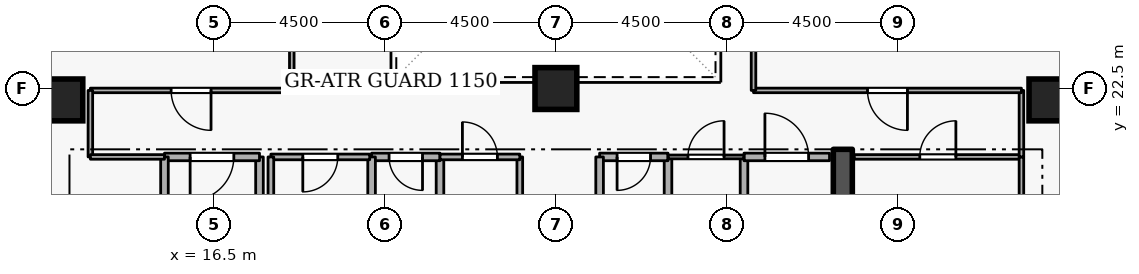
"""IFC4 building model, lengths in metres.
Left out: names, types, materials, properties, quantities, classifications, styles, units other than length and angle.
Written with IfcOpenShell. Run it as: python <this file> out.ifc"""

import sys

from ifc_helpers import new_model, si_unit, direction, frame, frame_2d, origin, origin_2d, place, context, subcontext, project, spatial, rectangle, extrude, element, fill, save


model = new_model("IFC4")
c1 = context("Model", 3, precision=1e-05, world=origin(), true_north=direction((0.0, 1.0)))
c2 = subcontext(c1, "Body", "Model", "MODEL_VIEW")
j1 = project(units=[si_unit("LENGTHUNIT", "METRE"), si_unit("PLANEANGLEUNIT", "RADIAN")], contexts=[c1])
p1 = place(None, origin())
s1 = spatial("IfcSite", under=j1, at=p1, CompositionType="ELEMENT")
p2 = place(p1, origin())
s2 = spatial("IfcBuilding", under=s1, at=p2, CompositionType="ELEMENT")
p3 = place(p2, frame((0.0, 0.0, 178.5)))
s3 = spatial("IfcBuildingStorey", under=s2, at=p3, CompositionType="ELEMENT", Elevation=178.5)
p4 = place(p3, frame((33.05, 15.1, 0.0), z_axis=(0.0, 0.0, 1.0), x_axis=(0.0, 1.0, 0.0)))
e1 = element("IfcWall", 1, at=p4, inside=s3, PredefinedType="SHEAR", context=c2, shape_type="SweptSolid", body=[
    extrude(rectangle(XDim=5.8, YDim=0.5, at=frame_2d((2.9, 0.0))), origin(), (0.0, 0.0, 1.0), 3.6),
])
for number, where, z_axis, x_axis in (
    (2, (12.5, 22.2, 0.0), (0.0, 0.0, 1.0), (1.0, 0.0, 0.0)),
    (3, (38.5, 22.2, 0.0), (0.0, 0.0, 1.0), (1.0, 0.0, 0.0)),
    (4, (25.5, 22.5, 0.0), (0.0, 0.0, 1.0), (1.0, 0.0, 0.0)),
):
    element("IfcColumn", number, at=place(p3, frame(where, z_axis=z_axis, x_axis=x_axis)), inside=s3, PredefinedType="COLUMN", context=c2, shape_type="SweptSolid", body=[
        extrude(rectangle(XDim=1.1, YDim=1.1, at=origin_2d()), origin(), (0.0, 0.0, 1.0), 3.6),
    ])
p5 = place(p3, frame((17.7, 18.4, 0.0), z_axis=(0.0, 0.0, 1.0), x_axis=(0.0, 1.0, 0.0)))
e5 = element("IfcWall", 5, at=p5, inside=s3, PredefinedType="STANDARD", context=c2, shape_type="SweptSolid", body=[
    extrude(rectangle(XDim=2.3, YDim=0.2, at=frame_2d((1.15, 0.0))), origin(), (0.0, 0.0, 1.0), 2.545),
])
p6 = place(p3, frame((17.7, 20.7, 0.0), z_axis=(0.0, 0.0, 1.0), x_axis=(-1.0, 0.0, 0.0)))
e6 = element("IfcWall", 6, at=p6, inside=s3, PredefinedType="STANDARD", context=c2, shape_type="SweptSolid", body=[
    extrude(rectangle(XDim=2.5, YDim=0.2, at=frame_2d((1.25, 0.0))), origin(), (0.0, 0.0, 1.0), 3.34),
])
p7 = place(p6, frame((0.675, 0.0, 0.0)))
e7 = element("IfcOpeningElement", 7, at=p7, cuts=e6, PredefinedType="OPENING", context=c2, shape_type="SweptSolid", body=[
    extrude(rectangle(XDim=1.15, YDim=2.1, at=frame_2d((0.575, 1.05))), frame((0.0, 0.11, 0.0), z_axis=(0.0, -1.0, 0.0), x_axis=(1.0, 0.0, 0.0)), (0.0, 0.0, 1.0), 0.22),
])
p8 = place(p3, frame((15.2, 20.7, 0.0), z_axis=(0.0, 0.0, 1.0), x_axis=(0.0, -1.0, 0.0)))
e8 = element("IfcWall", 8, at=p8, inside=s3, PredefinedType="STANDARD", context=c2, shape_type="SweptSolid", body=[
    extrude(rectangle(XDim=5.7, YDim=0.2, at=frame_2d((2.85, 0.0))), origin(), (0.0, 0.0, 1.0), 3.34),
])
p9 = place(p3, frame((28.45, 18.65, 0.0), z_axis=(0.0, 0.0, 1.0), x_axis=(0.0, 1.0, 0.0)))
e9 = element("IfcWall", 9, at=p9, inside=s3, PredefinedType="STANDARD", context=c2, shape_type="SweptSolid", body=[
    extrude(rectangle(XDim=2.05, YDim=0.2, at=frame_2d((1.025, 0.0))), origin(), (0.0, 0.0, 1.0), 3.34),
])
p10 = place(p3, frame((28.45, 20.7, 0.0), z_axis=(0.0, 0.0, 1.0), x_axis=(-1.0, 0.0, 0.0)))
e10 = element("IfcWall", 10, at=p10, inside=s3, PredefinedType="STANDARD", context=c2, shape_type="SweptSolid", body=[
    extrude(rectangle(XDim=1.8, YDim=0.2, at=frame_2d((0.9, 0.0))), origin(), (0.0, 0.0, 1.0), 3.34),
])
p11 = place(p10, frame((0.46, 0.0, 0.0)))
e11 = element("IfcOpeningElement", 11, at=p11, cuts=e10, PredefinedType="OPENING", context=c2, shape_type="SweptSolid", body=[
    extrude(rectangle(XDim=0.88, YDim=2.04, at=frame_2d((0.44, 1.02))), frame((0.0, 0.11, 0.0), z_axis=(0.0, -1.0, 0.0), x_axis=(1.0, 0.0, 0.0)), (0.0, 0.0, 1.0), 0.22),
])
for number, where, z_axis, x_axis in (
    (12, (26.65, 20.7, 0.0), (0.0, 0.0, 1.0), (0.0, -1.0, 0.0)),
    (13, (22.45, 18.65, 0.0), (0.0, 0.0, 1.0), (0.0, 1.0, 0.0)),
):
    element("IfcWall", number, at=place(p3, frame(where, z_axis=z_axis, x_axis=x_axis)), inside=s3, PredefinedType="STANDARD", context=c2, shape_type="SweptSolid", body=[
        extrude(rectangle(XDim=2.05, YDim=0.2, at=frame_2d((1.025, 0.0))), origin(), (0.0, 0.0, 1.0), 3.34),
    ])
p12 = place(p3, frame((22.45, 20.7, 0.0), z_axis=(0.0, 0.0, 1.0), x_axis=(-1.0, 0.0, 0.0)))
e14 = element("IfcWall", 14, at=p12, inside=s3, PredefinedType="STANDARD", context=c2, shape_type="SweptSolid", body=[
    extrude(rectangle(XDim=1.8, YDim=0.2, at=frame_2d((0.9, 0.0))), origin(), (0.0, 0.0, 1.0), 3.34),
])
p13 = place(p12, frame((0.46, 0.0, 0.0)))
e15 = element("IfcOpeningElement", 15, at=p13, cuts=e14, PredefinedType="OPENING", context=c2, shape_type="SweptSolid", body=[
    extrude(rectangle(XDim=0.88, YDim=2.04, at=frame_2d((0.44, 1.02))), frame((0.0, 0.11, 0.0), z_axis=(0.0, -1.0, 0.0), x_axis=(1.0, 0.0, 0.0)), (0.0, 0.0, 1.0), 0.22),
])
for number, where, z_axis, x_axis in (
    (16, (20.65, 20.7, 0.0), (0.0, 0.0, 1.0), (0.0, -1.0, 0.0)),
    (17, (30.45, 18.65, 0.0), (0.0, 0.0, 1.0), (0.0, 1.0, 0.0)),
):
    element("IfcWall", number, at=place(p3, frame(where, z_axis=z_axis, x_axis=x_axis)), inside=s3, PredefinedType="STANDARD", context=c2, shape_type="SweptSolid", body=[
        extrude(rectangle(XDim=2.05, YDim=0.2, at=frame_2d((1.025, 0.0))), origin(), (0.0, 0.0, 1.0), 3.34),
    ])
p14 = place(p3, frame((30.45, 20.7, 0.0), z_axis=(0.0, 0.0, 1.0), x_axis=(1.0, 0.0, 0.0)))
e18 = element("IfcWall", 18, at=p14, inside=s3, PredefinedType="STANDARD", context=c2, shape_type="SweptSolid", body=[
    extrude(rectangle(XDim=2.25, YDim=0.2, at=frame_2d((1.125, 0.0))), origin(), (0.0, 0.0, 1.0), 3.34),
])
p15 = place(p14, frame((0.55, 0.0, 0.0)))
e19 = element("IfcOpeningElement", 19, at=p15, cuts=e18, PredefinedType="OPENING", context=c2, shape_type="SweptSolid", body=[
    extrude(rectangle(XDim=1.15, YDim=2.1, at=frame_2d((0.575, 1.05))), frame((0.0, 0.11, 0.0), z_axis=(0.0, -1.0, 0.0), x_axis=(1.0, 0.0, 0.0)), (0.0, 0.0, 1.0), 0.22),
])
p16 = place(p3, frame((20.6, 20.7, 0.0), z_axis=(0.0, 0.0, 1.0), x_axis=(-1.0, 0.0, 0.0)))
e20 = element("IfcWall", 20, at=p16, inside=s3, PredefinedType="PARTITIONING", context=c2, shape_type="SweptSolid", body=[
    extrude(rectangle(XDim=2.6, YDim=0.15, at=frame_2d((1.3, 0.0))), origin(), (0.0, 0.0, 1.0), 3.34),
])
p17 = place(p16, frame((0.84, 0.0, 0.0)))
e21 = element("IfcOpeningElement", 21, at=p17, cuts=e20, PredefinedType="OPENING", context=c2, shape_type="SweptSolid", body=[
    extrude(rectangle(XDim=0.92, YDim=2.08, at=frame_2d((0.46, 1.04))), frame((0.0, 0.085, 0.0), z_axis=(0.0, -1.0, 0.0), x_axis=(1.0, 0.0, 0.0)), (0.0, 0.0, 1.0), 0.17),
])
p18 = place(p3, frame((18.0, 20.7, 0.0), z_axis=(0.0, 0.0, 1.0), x_axis=(0.0, -1.0, 0.0)))
e22 = element("IfcWall", 22, at=p18, inside=s3, PredefinedType="PARTITIONING", context=c2, shape_type="SweptSolid", body=[
    extrude(rectangle(XDim=2.05, YDim=0.15, at=frame_2d((1.025, 0.0))), origin(), (0.0, 0.0, 1.0), 2.545),
])
p19 = place(p3, frame((24.55, 20.7, 0.0), z_axis=(0.0, 0.0, 1.0), x_axis=(0.0, -1.0, 0.0)))
e23 = element("IfcWall", 23, at=p19, inside=s3, PredefinedType="PARTITIONING", context=c2, shape_type="SweptSolid", body=[
    extrude(rectangle(XDim=2.05, YDim=0.15, at=frame_2d((1.025, 0.0))), origin(), (0.0, 0.0, 1.0), 3.34),
])
p20 = place(p3, frame((22.45, 20.7, 0.0), z_axis=(0.0, 0.0, 1.0), x_axis=(1.0, 0.0, 0.0)))
e24 = element("IfcWall", 24, at=p20, inside=s3, PredefinedType="PARTITIONING", context=c2, shape_type="SweptSolid", body=[
    extrude(rectangle(XDim=2.1, YDim=0.15, at=frame_2d((1.05, 0.0))), origin(), (0.0, 0.0, 1.0), 3.34),
])
p21 = place(p20, frame((0.59, 0.0, 0.0)))
e25 = element("IfcOpeningElement", 25, at=p21, cuts=e24, PredefinedType="OPENING", context=c2, shape_type="SweptSolid", body=[
    extrude(rectangle(XDim=0.92, YDim=2.08, at=frame_2d((0.46, 1.04))), frame((0.0, 0.085, 0.0), z_axis=(0.0, -1.0, 0.0), x_axis=(1.0, 0.0, 0.0)), (0.0, 0.0, 1.0), 0.17),
])
p22 = place(p3, frame((28.45, 20.7, 0.0), z_axis=(0.0, 0.0, 1.0), x_axis=(1.0, 0.0, 0.0)))
e26 = element("IfcWall", 26, at=p22, inside=s3, PredefinedType="PARTITIONING", context=c2, shape_type="SweptSolid", body=[
    extrude(rectangle(XDim=2.0, YDim=0.1, at=frame_2d((1.0, 0.0))), origin(), (0.0, 0.0, 1.0), 3.34),
])
p23 = place(p22, frame((0.525, 0.0, 0.0)))
e27 = element("IfcOpeningElement", 27, at=p23, cuts=e26, PredefinedType="OPENING", context=c2, shape_type="SweptSolid", body=[
    extrude(rectangle(XDim=0.95, YDim=2.1, at=frame_2d((0.475, 1.05))), frame((0.0, 0.06, 0.0), z_axis=(0.0, -1.0, 0.0), x_axis=(1.0, 0.0, 0.0)), (0.0, 0.0, 1.0), 0.12),
])
p24 = place(p3, frame((33.35, 20.7, 0.0), z_axis=(0.0, 0.0, 1.0), x_axis=(1.0, 0.0, 0.0)))
e28 = element("IfcWall", 28, at=p24, inside=s3, PredefinedType="PARTITIONING", context=c2, shape_type="SweptSolid", body=[
    extrude(rectangle(XDim=4.4, YDim=0.12, at=frame_2d((2.2, 0.0))), origin(), (0.0, 0.0, 1.0), 3.34),
])
p25 = place(p24, frame((1.725, 0.0, 0.0)))
e29 = element("IfcOpeningElement", 29, at=p25, cuts=e28, PredefinedType="OPENING", context=c2, shape_type="SweptSolid", body=[
    extrude(rectangle(XDim=0.95, YDim=2.1, at=frame_2d((0.475, 1.05))), frame((0.0, 0.07, 0.0), z_axis=(0.0, -1.0, 0.0), x_axis=(1.0, 0.0, 0.0)), (0.0, 0.0, 1.0), 0.14),
])
p26 = place(p3, frame((37.75, 20.7, 0.0), z_axis=(0.0, 0.0, 1.0), x_axis=(0.0, -1.0, 0.0)))
e30 = element("IfcWall", 30, at=p26, inside=s3, PredefinedType="PARTITIONING", context=c2, shape_type="SweptSolid", body=[
    extrude(rectangle(XDim=5.65, YDim=0.12, at=frame_2d((2.825, 0.0))), origin(), (0.0, 0.0, 1.0), 3.34),
])
p27 = place(p3, frame((18.55, 27.0, 0.0), z_axis=(0.0, 0.0, 1.0), x_axis=(0.0, -1.0, 0.0)))
e31 = element("IfcWall", 31, at=p27, inside=s3, PredefinedType="PARTITIONING", context=c2, shape_type="SweptSolid", body=[
    extrude(rectangle(XDim=4.55, YDim=0.12, at=frame_2d((2.275, 0.0))), origin(), (0.0, 0.0, 1.0), 3.34),
])
p28 = place(p3, frame((18.55, 22.45, 0.0), z_axis=(0.0, 0.0, 1.0), x_axis=(-1.0, 0.0, 0.0)))
e32 = element("IfcWall", 32, at=p28, inside=s3, PredefinedType="PARTITIONING", context=c2, shape_type="SweptSolid", body=[
    extrude(rectangle(XDim=5.3, YDim=0.12, at=frame_2d((2.65, 0.0))), origin(), (0.0, 0.0, 1.0), 3.34),
])
p29 = place(p28, frame((2.125, 0.0, 0.0)))
e33 = element("IfcOpeningElement", 33, at=p29, cuts=e32, PredefinedType="OPENING", context=c2, shape_type="SweptSolid", body=[
    extrude(rectangle(XDim=1.05, YDim=2.1, at=frame_2d((0.525, 1.05))), frame((0.0, 0.07, 0.0), z_axis=(0.0, -1.0, 0.0), x_axis=(1.0, 0.0, 0.0)), (0.0, 0.0, 1.0), 0.14),
])
p30 = place(p3, frame((13.25, 22.45, 0.0), z_axis=(0.0, 0.0, 1.0), x_axis=(0.0, -1.0, 0.0)))
e34 = element("IfcWall", 34, at=p30, inside=s3, PredefinedType="PARTITIONING", context=c2, shape_type="SweptSolid", body=[
    extrude(rectangle(XDim=1.75, YDim=0.12, at=frame_2d((0.875, 0.0))), origin(), (0.0, 0.0, 1.0), 3.34),
])
p31 = place(p3, frame((13.25, 20.7, 0.0), z_axis=(0.0, 0.0, 1.0), x_axis=(1.0, 0.0, 0.0)))
e35 = element("IfcWall", 35, at=p31, inside=s3, PredefinedType="PARTITIONING", context=c2, shape_type="SweptSolid", body=[
    extrude(rectangle(XDim=1.95, YDim=0.12, at=frame_2d((0.975, 0.0))), origin(), (0.0, 0.0, 1.0), 3.34),
])
p32 = place(p3, frame((37.75, 20.7, 0.0), z_axis=(0.0, 0.0, 1.0), x_axis=(0.0, 1.0, 0.0)))
e36 = element("IfcWall", 36, at=p32, inside=s3, PredefinedType="PARTITIONING", context=c2, shape_type="SweptSolid", body=[
    extrude(rectangle(XDim=1.75, YDim=0.12, at=frame_2d((0.875, 0.0))), origin(), (0.0, 0.0, 1.0), 3.34),
])
p33 = place(p3, frame((37.75, 22.45, 0.0), z_axis=(0.0, 0.0, 1.0), x_axis=(-1.0, 0.0, 0.0)))
e37 = element("IfcWall", 37, at=p33, inside=s3, PredefinedType="PARTITIONING", context=c2, shape_type="SweptSolid", body=[
    extrude(rectangle(XDim=7.05, YDim=0.12, at=frame_2d((3.525, 0.0))), origin(), (0.0, 0.0, 1.0), 3.34),
])
p34 = place(p33, frame((3.0, 0.0, 0.0)))
e38 = element("IfcOpeningElement", 38, at=p34, cuts=e37, PredefinedType="OPENING", context=c2, shape_type="SweptSolid", body=[
    extrude(rectangle(XDim=1.05, YDim=2.1, at=frame_2d((0.525, 1.05))), frame((0.0, 0.07, 0.0), z_axis=(0.0, -1.0, 0.0), x_axis=(1.0, 0.0, 0.0)), (0.0, 0.0, 1.0), 0.14),
])
p35 = place(p3, frame((30.7, 22.45, 0.0), z_axis=(0.0, 0.0, 1.0), x_axis=(0.0, 1.0, 0.0)))
e39 = element("IfcWall", 39, at=p35, inside=s3, PredefinedType="PARTITIONING", context=c2, shape_type="SweptSolid", body=[
    extrude(rectangle(XDim=4.55, YDim=0.12, at=frame_2d((2.275, 0.0))), origin(), (0.0, 0.0, 1.0), 3.34),
])
p36 = place(p7, origin())
e40 = element("IfcDoor", 40, at=p36, inside=s3, OperationType="SINGLE_SWING_RIGHT", PredefinedType="DOOR", context=c2, shape_type="SweptSolid", body=[
    extrude(rectangle(XDim=1.15, YDim=2.1, at=frame_2d((0.575, 1.05))), frame((0.0, 0.025, 0.0), z_axis=(0.0, -1.0, 0.0), x_axis=(1.0, 0.0, 0.0)), (0.0, 0.0, 1.0), 0.05),
])
fill(e7, e40)
p37 = place(p11, origin())
e41 = element("IfcDoor", 41, at=p37, inside=s3, OperationType="SINGLE_SWING_RIGHT", PredefinedType="DOOR", context=c2, shape_type="SweptSolid", body=[
    extrude(rectangle(XDim=0.88, YDim=2.04, at=frame_2d((0.44, 1.02))), frame((0.0, 0.025, 0.0), z_axis=(0.0, -1.0, 0.0), x_axis=(1.0, 0.0, 0.0)), (0.0, 0.0, 1.0), 0.05),
])
fill(e11, e41)
p38 = place(p13, origin())
e42 = element("IfcDoor", 42, at=p38, inside=s3, OperationType="SINGLE_SWING_LEFT", PredefinedType="DOOR", context=c2, shape_type="SweptSolid", body=[
    extrude(rectangle(XDim=0.88, YDim=2.04, at=frame_2d((0.44, 1.02))), frame((0.0, 0.025, 0.0), z_axis=(0.0, -1.0, 0.0), x_axis=(1.0, 0.0, 0.0)), (0.0, 0.0, 1.0), 0.05),
])
fill(e15, e42)
p39 = place(p17, origin())
e43 = element("IfcDoor", 43, at=p39, inside=s3, OperationType="SINGLE_SWING_RIGHT", PredefinedType="DOOR", context=c2, shape_type="SweptSolid", body=[
    extrude(rectangle(XDim=0.92, YDim=2.08, at=frame_2d((0.46, 1.04))), frame((0.0, 0.025, 0.0), z_axis=(0.0, -1.0, 0.0), x_axis=(1.0, 0.0, 0.0)), (0.0, 0.0, 1.0), 0.05),
])
fill(e21, e43)
p40 = place(p21, origin())
e44 = element("IfcDoor", 44, at=p40, inside=s3, OperationType="SINGLE_SWING_LEFT", PredefinedType="DOOR", context=c2, shape_type="SweptSolid", body=[
    extrude(rectangle(XDim=0.92, YDim=2.08, at=frame_2d((0.46, 1.04))), frame((0.0, 0.025, 0.0), z_axis=(0.0, -1.0, 0.0), x_axis=(1.0, 0.0, 0.0)), (0.0, 0.0, 1.0), 0.05),
])
fill(e25, e44)
p41 = place(p23, origin())
e45 = element("IfcDoor", 45, at=p41, inside=s3, OperationType="SINGLE_SWING_RIGHT", PredefinedType="DOOR", context=c2, shape_type="SweptSolid", body=[
    extrude(rectangle(XDim=0.95, YDim=2.1, at=frame_2d((0.475, 1.05))), frame((0.0, 0.025, 0.0), z_axis=(0.0, -1.0, 0.0), x_axis=(1.0, 0.0, 0.0)), (0.0, 0.0, 1.0), 0.05),
])
fill(e27, e45)
p42 = place(p15, origin())
e46 = element("IfcDoor", 46, at=p42, inside=s3, OperationType="SINGLE_SWING_LEFT", PredefinedType="DOOR", context=c2, shape_type="SweptSolid", body=[
    extrude(rectangle(XDim=1.15, YDim=2.1, at=frame_2d((0.575, 1.05))), frame((0.0, 0.025, 0.0), z_axis=(0.0, -1.0, 0.0), x_axis=(1.0, 0.0, 0.0)), (0.0, 0.0, 1.0), 0.05),
])
fill(e19, e46)
p43 = place(p25, origin())
e47 = element("IfcDoor", 47, at=p43, inside=s3, OperationType="SINGLE_SWING_RIGHT", PredefinedType="DOOR", context=c2, shape_type="SweptSolid", body=[
    extrude(rectangle(XDim=0.95, YDim=2.1, at=frame_2d((0.475, 1.05))), frame((0.0, 0.025, 0.0), z_axis=(0.0, -1.0, 0.0), x_axis=(1.0, 0.0, 0.0)), (0.0, 0.0, 1.0), 0.05),
])
fill(e29, e47)
p44 = place(p29, origin())
e48 = element("IfcDoor", 48, at=p44, inside=s3, OperationType="SINGLE_SWING_LEFT", PredefinedType="DOOR", context=c2, shape_type="SweptSolid", body=[
    extrude(rectangle(XDim=1.05, YDim=2.1, at=frame_2d((0.525, 1.05))), frame((0.0, 0.025, 0.0), z_axis=(0.0, -1.0, 0.0), x_axis=(1.0, 0.0, 0.0)), (0.0, 0.0, 1.0), 0.05),
])
fill(e33, e48)
p45 = place(p34, origin())
e49 = element("IfcDoor", 49, at=p45, inside=s3, OperationType="SINGLE_SWING_LEFT", PredefinedType="DOOR", context=c2, shape_type="SweptSolid", body=[
    extrude(rectangle(XDim=1.05, YDim=2.1, at=frame_2d((0.525, 1.05))), frame((0.0, 0.025, 0.0), z_axis=(0.0, -1.0, 0.0), x_axis=(1.0, 0.0, 0.0)), (0.0, 0.0, 1.0), 0.05),
])
fill(e38, e49)
save(model, sys.argv[1])
